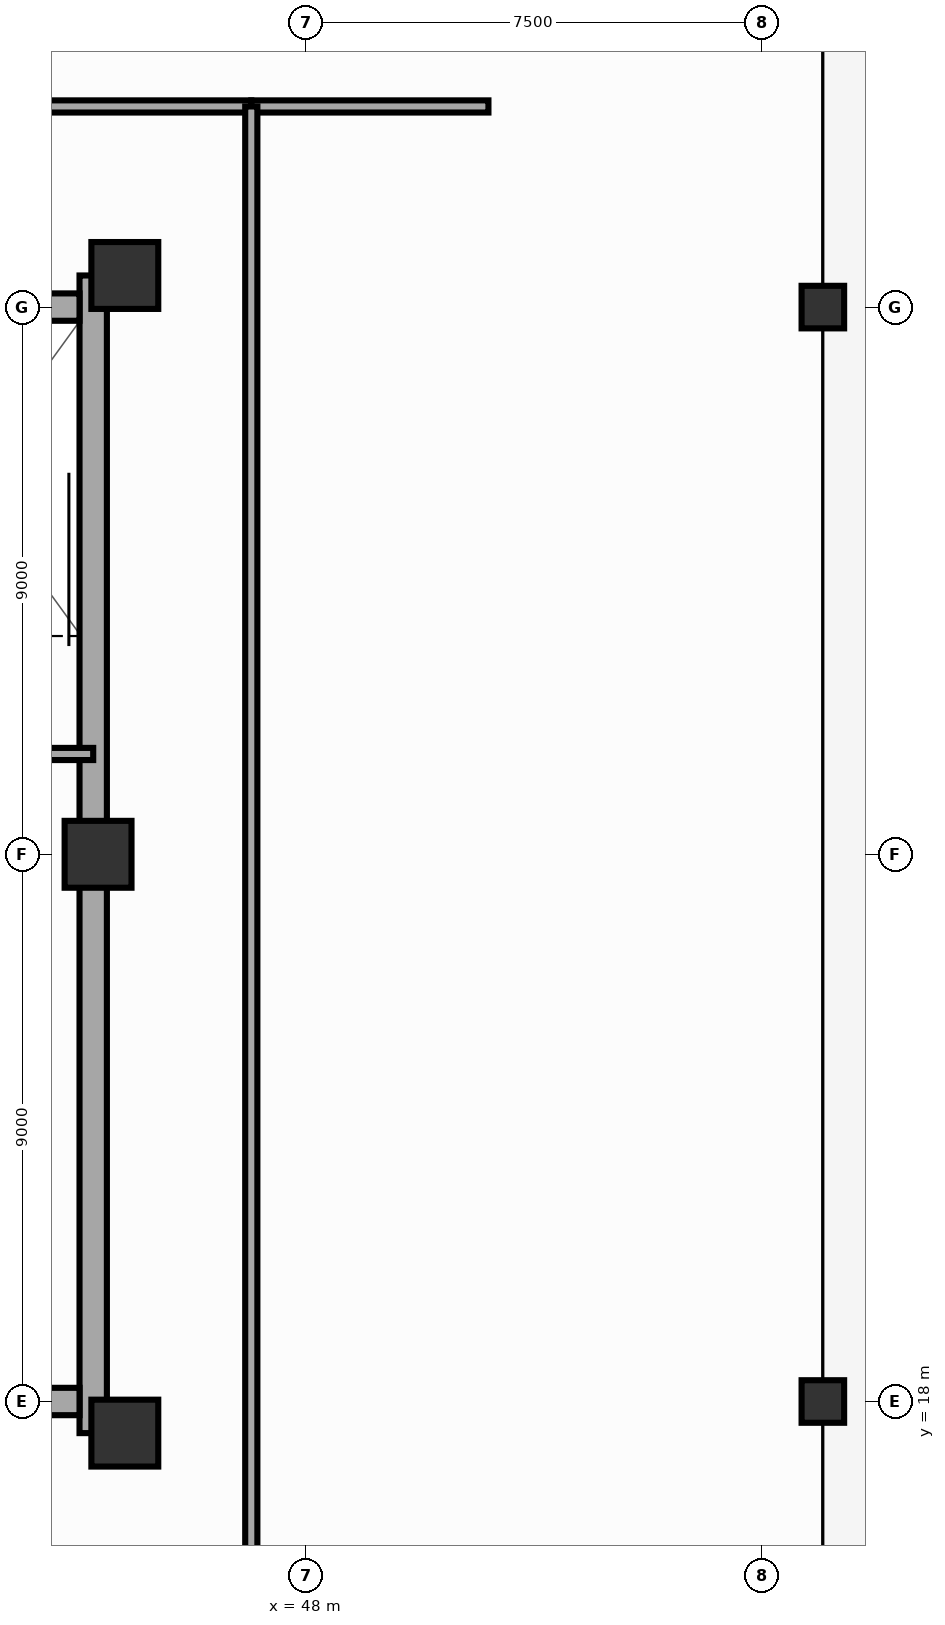
"""IFC4 building model, lengths in metres.
Left out: names, types, materials, properties, quantities, classifications, styles, units other than length and angle.
Written with IfcOpenShell. Run it as: python <this file> out.ifc"""

import sys

from ifc_helpers import new_model, si_unit, direction, frame, frame_2d, origin, origin_2d, place, context, subcontext, project, spatial, rectangle, extrude, source, transform, mapped, element, fill, save


model = new_model("IFC4")
c1 = context("Model", 3, precision=1e-05, world=origin(), true_north=direction((0.0, 1.0)))
c2 = subcontext(c1, "Body", "Model", "MODEL_VIEW")
j1 = project(units=[si_unit("LENGTHUNIT", "METRE"), si_unit("PLANEANGLEUNIT", "RADIAN")], contexts=[c1])
p1 = place(None, origin())
s1 = spatial("IfcSite", under=j1, at=p1, CompositionType="ELEMENT")
p2 = place(p1, origin())
s2 = spatial("IfcBuilding", under=s1, at=p2, CompositionType="ELEMENT")
p3 = place(p2, frame((0.0, 0.0, 206.5)))
s3 = spatial("IfcBuildingStorey", under=s2, at=p3, CompositionType="ELEMENT", Elevation=206.5)
p4 = place(p3, frame((44.5, 17.48, 0.0), z_axis=(0.0, 0.0, 1.0), x_axis=(0.0, 1.0, 0.0)))
e1 = element("IfcWall", 1, at=p4, inside=s3, PredefinedType="SHEAR", context=c2, shape_type="SweptSolid", body=[
    extrude(rectangle(XDim=19.04, YDim=0.45, at=frame_2d((9.52, 0.0))), origin(), (0.0, 0.0, 1.0), 3.8),
])
p5 = place(p4, frame((12.67, 0.0, 0.0), z_axis=(0.0, 0.0, 1.0), x_axis=(-1.0, 0.0, 0.0)))
e2 = element("IfcOpeningElement", 2, at=p5, cuts=e1, PredefinedType="OPENING", context=c2, shape_type="SweptSolid", body=[
    extrude(rectangle(XDim=1.1, YDim=2.15, at=frame_2d((0.55, 1.075))), frame((0.0, 0.237, 0.0), z_axis=(0.0, -1.0, 0.0), x_axis=(1.0, 0.0, 0.0)), (0.0, 0.0, 1.0), 0.474),
])
p6 = place(p3, frame((31.725, 18.0, 0.0), z_axis=(0.0, 0.0, 1.0), x_axis=(1.0, 0.0, 0.0)))
e3 = element("IfcWall", 3, at=p6, inside=s3, PredefinedType="SHEAR", context=c2, shape_type="SweptSolid", body=[
    extrude(rectangle(XDim=12.55, YDim=0.45, at=frame_2d((6.275, 0.0))), origin(), (0.0, 0.0, 1.0), 3.8),
])
p7 = place(p3, frame((31.725, 36.0, 0.0), z_axis=(0.0, 0.0, 1.0), x_axis=(1.0, 0.0, 0.0)))
e4 = element("IfcWall", 4, at=p7, inside=s3, PredefinedType="SHEAR", context=c2, shape_type="SweptSolid", body=[
    extrude(rectangle(XDim=12.55, YDim=0.45, at=frame_2d((6.275, 0.0))), origin(), (0.0, 0.0, 1.0), 3.8),
])
p8 = place(p7, frame((5.225, 0.0, 0.0), z_axis=(0.0, 0.0, 1.0), x_axis=(-1.0, 0.0, 0.0)))
e5 = element("IfcOpeningElement", 5, at=p8, cuts=e4, PredefinedType="OPENING", context=c2, shape_type="SweptSolid", body=[
    extrude(rectangle(XDim=1.4, YDim=2.15, at=frame_2d((0.7, 1.075))), frame((0.0, 0.237, 0.0), z_axis=(0.0, -1.0, 0.0), x_axis=(1.0, 0.0, 0.0)), (0.0, 0.0, 1.0), 0.474),
])
m1 = source(origin(), c2, "Body", "SweptSolid", [
    extrude(rectangle(XDim=1.1, YDim=1.1, at=origin_2d()), origin(), (0.0, 0.0, 1.0), 3.8),
])
for number, where, z_axis, x_axis in (
    (6, (45.02, 17.48, 0.0), (0.0, 0.0, 1.0), (1.0, 0.0, 0.0)),
    (7, (45.02, 36.52, 0.0), (0.0, 0.0, 1.0), (1.0, 0.0, 0.0)),
    (8, (44.58, 27.0, 0.0), (0.0, 0.0, 1.0), (1.0, 0.0, 0.0)),
):
    element("IfcColumn", number, at=place(p3, frame(where, z_axis=z_axis, x_axis=x_axis)), inside=s3, PredefinedType="COLUMN", context=c2, shape_type="MappedRepresentation", body=[
        mapped(m1, transform((0.0, 0.0, 0.0), scale=1.0)),
    ])
m2 = source(origin(), c2, "Body", "SweptSolid", [
    extrude(rectangle(XDim=0.7, YDim=0.7, at=origin_2d()), origin(), (0.0, 0.0, 1.0), 3.8),
])
for number, where, z_axis, x_axis in (
    (9, (56.5, 18.0, 0.0), (0.0, 0.0, 1.0), (1.0, 0.0, 0.0)),
    (10, (56.5, 36.0, 0.0), (0.0, 0.0, 1.0), (1.0, 0.0, 0.0)),
):
    element("IfcColumn", number, at=place(p3, frame(where, z_axis=z_axis, x_axis=x_axis)), inside=s3, PredefinedType="COLUMN", context=c2, shape_type="MappedRepresentation", body=[
        mapped(m2, transform((0.0, 0.0, 0.0), scale=1.0)),
    ])
p9 = place(p3, frame((40.57, 28.65, 0.0), z_axis=(0.0, 0.0, 1.0), x_axis=(1.0, 0.0, 0.0)))
e11 = element("IfcWall", 11, at=p9, inside=s3, PredefinedType="SOLIDWALL", context=c2, shape_type="SweptSolid", body=[
    extrude(rectangle(XDim=3.93, YDim=0.2, at=frame_2d((1.965, 0.0))), origin(), (0.0, 0.0, 1.0), 3.59),
])
p10 = place(p3, frame((28.9, 39.3, 0.0), z_axis=(0.0, 0.0, 1.0), x_axis=(1.0, 0.0, 0.0)))
e12 = element("IfcWall", 12, at=p10, inside=s3, PredefinedType="PARTITIONING", context=c2, shape_type="SweptSolid", body=[
    extrude(rectangle(XDim=18.2, YDim=0.2, at=frame_2d((9.1, 0.0))), origin(), (0.0, 0.0, 1.0), 3.59),
])
p11 = place(p10, frame((8.55, 0.0, 0.0)))
e13 = element("IfcOpeningElement", 13, at=p11, cuts=e12, PredefinedType="OPENING", context=c2, shape_type="SweptSolid", body=[
    extrude(rectangle(XDim=1.1, YDim=2.15, at=frame_2d((0.55, 1.075))), frame((0.0, 0.112, 0.0), z_axis=(0.0, -1.0, 0.0), x_axis=(1.0, 0.0, 0.0)), (0.0, 0.0, 1.0), 0.224),
])
p12 = place(p3, frame((47.1, 39.3, 0.0), z_axis=(0.0, 0.0, 1.0), x_axis=(1.0, 0.0, 0.0)))
e14 = element("IfcWall", 14, at=p12, inside=s3, PredefinedType="PARTITIONING", context=c2, shape_type="SweptSolid", body=[
    extrude(rectangle(XDim=3.9, YDim=0.2, at=frame_2d((1.95, 0.0))), origin(), (0.0, 0.0, 1.0), 3.59),
])
p13 = place(p3, frame((47.1, 14.5, 0.0), z_axis=(0.0, 0.0, 1.0), x_axis=(0.0, 1.0, 0.0)))
e15 = element("IfcWall", 15, at=p13, inside=s3, PredefinedType="PARTITIONING", context=c2, shape_type="SweptSolid", body=[
    extrude(rectangle(XDim=24.8, YDim=0.2, at=frame_2d((12.4, 0.0))), origin(), (0.0, 0.0, 1.0), 3.59),
])
p14 = place(p13, frame((11.85, 0.0, 0.0)))
e16 = element("IfcOpeningElement", 16, at=p14, cuts=e15, PredefinedType="OPENING", context=c2, shape_type="SweptSolid", body=[
    extrude(rectangle(XDim=1.1, YDim=2.15, at=frame_2d((0.55, 1.075))), frame((0.0, 0.112, 0.0), z_axis=(0.0, -1.0, 0.0), x_axis=(1.0, 0.0, 0.0)), (0.0, 0.0, 1.0), 0.224),
])
m3 = source(origin(), c2, "Body", "SweptSolid", [
    extrude(rectangle(XDim=1.1, YDim=2.15, at=frame_2d((0.55, 1.075))), frame((0.0, 0.025, 0.0), z_axis=(0.0, -1.0, 0.0), x_axis=(1.0, 0.0, 0.0)), (0.0, 0.0, 1.0), 0.05),
])
p15 = place(p5, origin())
e17 = element("IfcDoor", 17, at=p15, inside=s3, OperationType="SINGLE_SWING_RIGHT", PredefinedType="DOOR", context=c2, shape_type="MappedRepresentation", body=[
    mapped(m3, transform((0.0, 0.0, 0.0), scale=1.0)),
])
fill(e2, e17)
p16 = place(p14, origin())
e18 = element("IfcDoor", 18, at=p16, inside=s3, OperationType="SINGLE_SWING_LEFT", PredefinedType="DOOR", context=c2, shape_type="MappedRepresentation", body=[
    mapped(m3, transform((0.0, 0.0, 0.0), scale=1.0)),
])
fill(e16, e18)
save(model, sys.argv[1])
